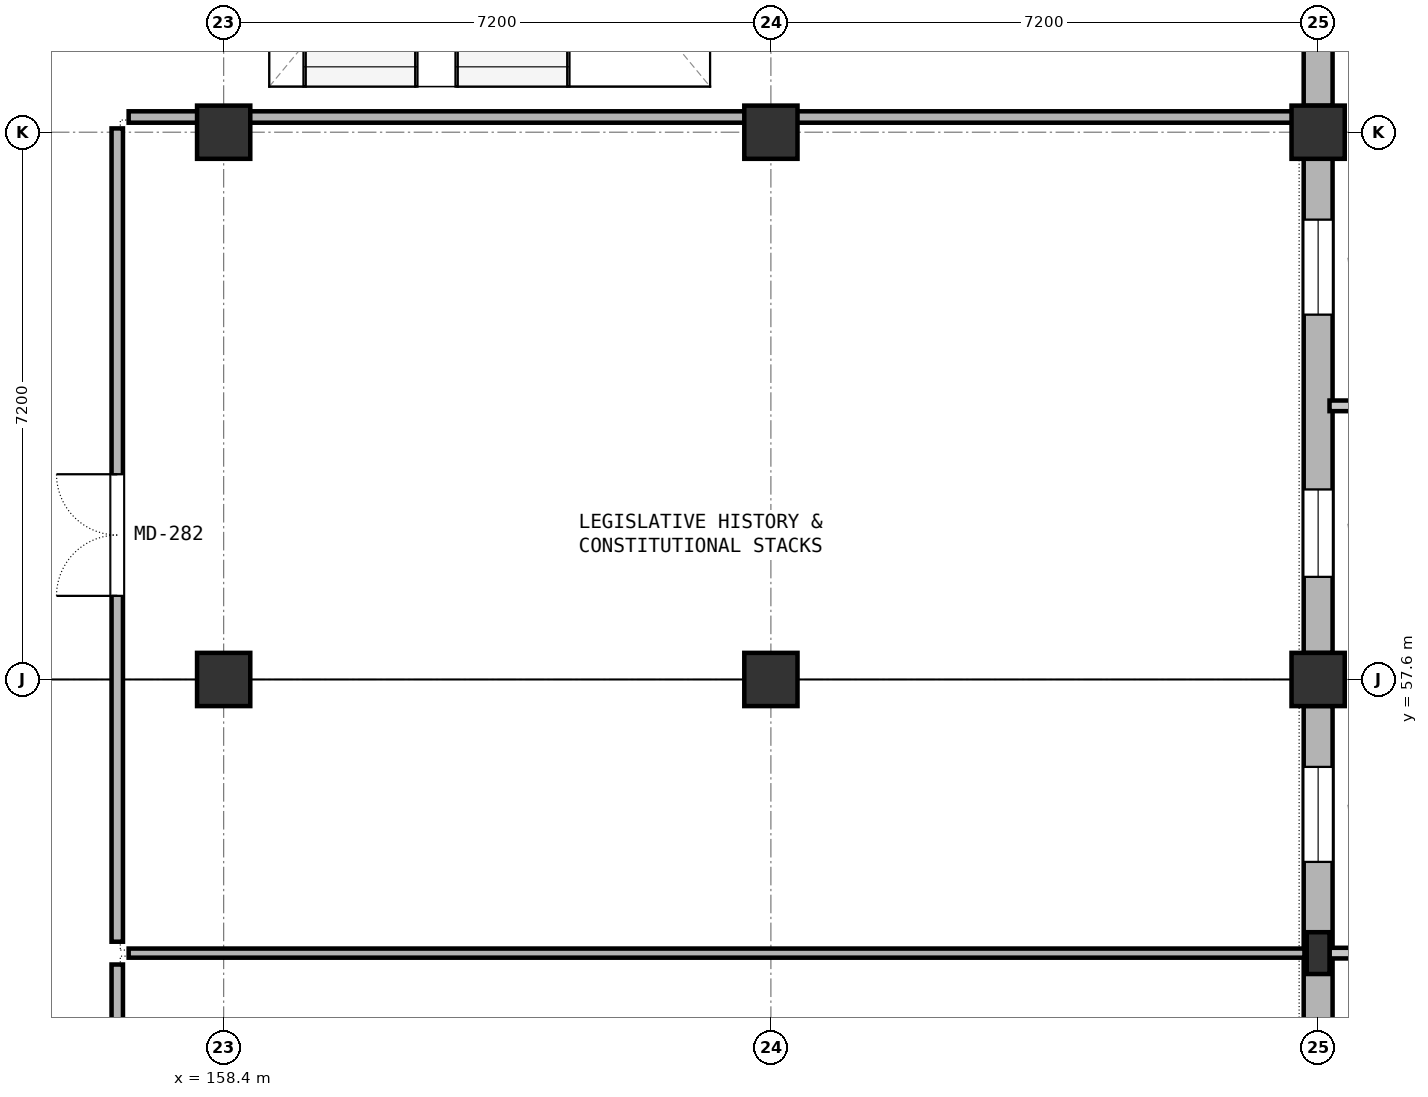
"""IFC4 building model, lengths in metres.
Left out: names, types, materials, properties, quantities, classifications, styles, units other than length and angle.
Written with IfcOpenShell. Run it as: python <this file> out.ifc"""

import sys

from ifc_helpers import new_model, si_unit, direction, frame, frame_2d, origin, origin_2d, place, context, subcontext, project, spatial, rectangle, extrude, element, fill, save


model = new_model("IFC4")
c1 = context("Model", 3, precision=1e-05, world=origin(), true_north=direction((0.0, 1.0)))
c2 = subcontext(c1, "Body", "Model", "MODEL_VIEW")
j1 = project(units=[si_unit("LENGTHUNIT", "METRE"), si_unit("PLANEANGLEUNIT", "RADIAN")], contexts=[c1])
p1 = place(None, origin())
s1 = spatial("IfcSite", under=j1, at=p1, CompositionType="ELEMENT")
p2 = place(p1, origin())
s2 = spatial("IfcBuilding", under=s1, at=p2, CompositionType="ELEMENT")
p3 = place(p2, frame((0.0, 0.0, 5.4)))
s3 = spatial("IfcBuildingStorey", under=s2, at=p3, CompositionType="ELEMENT", Elevation=5.4)
for number, where, z_axis, x_axis in (
    (1, (158.4, 57.6, 0.0), (0.0, 0.0, 1.0), (1.0, 0.0, 0.0)),
    (2, (158.4, 64.8, 0.0), (0.0, 0.0, 1.0), (1.0, 0.0, 0.0)),
    (3, (165.6, 57.6, 0.0), (0.0, 0.0, 1.0), (1.0, 0.0, 0.0)),
    (4, (165.6, 64.8, 0.0), (0.0, 0.0, 1.0), (1.0, 0.0, 0.0)),
    (5, (172.8, 57.6, 0.0), (0.0, 0.0, 1.0), (1.0, 0.0, 0.0)),
    (6, (172.8, 64.8, 0.0), (0.0, 0.0, 1.0), (1.0, 0.0, 0.0)),
):
    element("IfcColumn", number, at=place(p3, frame(where, z_axis=z_axis, x_axis=x_axis)), inside=s3, PredefinedType="COLUMN", context=c2, shape_type="SweptSolid", body=[
        extrude(rectangle(XDim=0.7, YDim=0.7, at=origin_2d()), origin(), (0.0, 0.0, 1.0), 4.8),
    ])
p4 = place(p3, frame((172.8, 54.0, 0.0), z_axis=(0.0, 0.0, 1.0), x_axis=(0.0, 1.0, 0.0)))
e7 = element("IfcColumn", 7, at=p4, inside=s3, PredefinedType="PILASTER", context=c2, shape_type="SweptSolid", body=[
    extrude(rectangle(XDim=0.55, YDim=0.3, at=origin_2d()), origin(), (0.0, 0.0, 1.0), 4.8),
])
p5 = place(p3, frame((172.8, 57.252, 0.0), z_axis=(0.0, 0.0, 1.0), x_axis=(0.0, -1.0, 0.0)))
e8 = element("IfcWall", 8, at=p5, inside=s3, PredefinedType="SOLIDWALL", context=c2, shape_type="SweptSolid", body=[
    extrude(rectangle(XDim=6.504, YDim=0.38, at=frame_2d((3.252, 0.0))), origin(), (0.0, 0.0, 1.0), 3.5),
])
p6 = place(p5, frame((0.802, 0.0, 0.65)))
e9 = element("IfcOpeningElement", 9, at=p6, cuts=e8, PredefinedType="OPENING", context=c2, shape_type="SweptSolid", body=[
    extrude(rectangle(XDim=1.25, YDim=2.5, at=frame_2d((0.625, 1.25))), frame((0.0, 0.2, 0.0), z_axis=(0.0, -1.0, 0.0), x_axis=(1.0, 0.0, 0.0)), (0.0, 0.0, 1.0), 0.4),
])
p7 = place(p5, frame((4.352, 0.0, 0.65)))
e10 = element("IfcOpeningElement", 10, at=p7, cuts=e8, PredefinedType="OPENING", context=c2, shape_type="SweptSolid", body=[
    extrude(rectangle(XDim=1.15, YDim=2.3, at=frame_2d((0.575, 1.15))), frame((0.0, 0.2, 0.0), z_axis=(0.0, -1.0, 0.0), x_axis=(1.0, 0.0, 0.0)), (0.0, 0.0, 1.0), 0.4),
])
p8 = place(p3, frame((172.8, 64.452, 0.0), z_axis=(0.0, 0.0, 1.0), x_axis=(0.0, -1.0, 0.0)))
e11 = element("IfcWall", 11, at=p8, inside=s3, PredefinedType="SOLIDWALL", context=c2, shape_type="SweptSolid", body=[
    extrude(rectangle(XDim=6.504, YDim=0.38, at=frame_2d((3.252, 0.0))), origin(), (0.0, 0.0, 1.0), 3.5),
])
p9 = place(p8, frame((0.802, 0.0, 0.65)))
e12 = element("IfcOpeningElement", 12, at=p9, cuts=e11, PredefinedType="OPENING", context=c2, shape_type="SweptSolid", body=[
    extrude(rectangle(XDim=1.25, YDim=2.5, at=frame_2d((0.625, 1.25))), frame((0.0, 0.2, 0.0), z_axis=(0.0, -1.0, 0.0), x_axis=(1.0, 0.0, 0.0)), (0.0, 0.0, 1.0), 0.4),
])
p10 = place(p8, frame((4.352, 0.0, 0.65)))
e13 = element("IfcOpeningElement", 13, at=p10, cuts=e11, PredefinedType="OPENING", context=c2, shape_type="SweptSolid", body=[
    extrude(rectangle(XDim=1.15, YDim=2.3, at=frame_2d((0.575, 1.15))), frame((0.0, 0.2, 0.0), z_axis=(0.0, -1.0, 0.0), x_axis=(1.0, 0.0, 0.0)), (0.0, 0.0, 1.0), 0.4),
])
p11 = place(p3, frame((172.8, 71.652, 0.0), z_axis=(0.0, 0.0, 1.0), x_axis=(0.0, -1.0, 0.0)))
e14 = element("IfcWall", 14, at=p11, inside=s3, PredefinedType="SOLIDWALL", context=c2, shape_type="SweptSolid", body=[
    extrude(rectangle(XDim=6.504, YDim=0.38, at=frame_2d((3.252, 0.0))), origin(), (0.0, 0.0, 1.0), 3.5),
])
p12 = place(p11, frame((0.802, 0.0, 0.65)))
e15 = element("IfcOpeningElement", 15, at=p12, cuts=e14, PredefinedType="OPENING", context=c2, shape_type="SweptSolid", body=[
    extrude(rectangle(XDim=1.25, YDim=2.5, at=frame_2d((0.625, 1.25))), frame((0.0, 0.2, 0.0), z_axis=(0.0, -1.0, 0.0), x_axis=(1.0, 0.0, 0.0)), (0.0, 0.0, 1.0), 0.4),
])
p13 = place(p11, frame((4.352, 0.0, 0.65)))
e16 = element("IfcOpeningElement", 16, at=p13, cuts=e14, PredefinedType="OPENING", context=c2, shape_type="SweptSolid", body=[
    extrude(rectangle(XDim=1.15, YDim=2.3, at=frame_2d((0.575, 1.15))), frame((0.0, 0.2, 0.0), z_axis=(0.0, -1.0, 0.0), x_axis=(1.0, 0.0, 0.0)), (0.0, 0.0, 1.0), 0.4),
])
p14 = place(p3, frame((157.0, 36.95, 0.0), z_axis=(0.0, 0.0, 1.0), x_axis=(0.0, 1.0, 0.0)))
e17 = element("IfcWall", 17, at=p14, inside=s3, PredefinedType="PARTITIONING", context=c2, shape_type="SweptSolid", body=[
    extrude(rectangle(XDim=16.9, YDim=0.15, at=frame_2d((8.45, 0.0))), origin(), (0.0, 0.0, 1.0), 3.52),
])
p15 = place(p14, frame((7.65, 0.0, 0.0)))
e18 = element("IfcOpeningElement", 18, at=p15, cuts=e17, PredefinedType="OPENING", context=c2, shape_type="SweptSolid", body=[
    extrude(rectangle(XDim=1.6, YDim=2.2, at=frame_2d((0.8, 1.1))), frame((0.0, 0.085, 0.0), z_axis=(0.0, -1.0, 0.0), x_axis=(1.0, 0.0, 0.0)), (0.0, 0.0, 1.0), 0.17),
])
p16 = place(p3, frame((157.0, 54.15, 0.0), z_axis=(0.0, 0.0, 1.0), x_axis=(0.0, 1.0, 0.0)))
e19 = element("IfcWall", 19, at=p16, inside=s3, PredefinedType="PARTITIONING", context=c2, shape_type="SweptSolid", body=[
    extrude(rectangle(XDim=10.7, YDim=0.15, at=frame_2d((5.35, 0.0))), origin(), (0.0, 0.0, 1.0), 3.52),
])
p17 = place(p16, frame((4.55, 0.0, 0.0)))
e20 = element("IfcOpeningElement", 20, at=p17, cuts=e19, PredefinedType="OPENING", context=c2, shape_type="SweptSolid", body=[
    extrude(rectangle(XDim=1.6, YDim=2.2, at=frame_2d((0.8, 1.1))), frame((0.0, 0.085, 0.0), z_axis=(0.0, -1.0, 0.0), x_axis=(1.0, 0.0, 0.0)), (0.0, 0.0, 1.0), 0.17),
])
p18 = place(p3, frame((157.15, 54.0, 0.0), z_axis=(0.0, 0.0, 1.0), x_axis=(1.0, 0.0, 0.0)))
e21 = element("IfcWall", 21, at=p18, inside=s3, PredefinedType="PARTITIONING", context=c2, shape_type="SweptSolid", body=[
    extrude(rectangle(XDim=15.47, YDim=0.12, at=frame_2d((7.735, 0.0))), origin(), (0.0, 0.0, 1.0), 3.52),
])
p19 = place(p3, frame((157.15, 65.0, 0.0), z_axis=(0.0, 0.0, 1.0), x_axis=(1.0, 0.0, 0.0)))
e22 = element("IfcWall", 22, at=p19, inside=s3, PredefinedType="PARTITIONING", context=c2, shape_type="SweptSolid", body=[
    extrude(rectangle(XDim=15.47, YDim=0.15, at=frame_2d((7.735, 0.0))), origin(), (0.0, 0.0, 1.0), 3.52),
])
p20 = place(p6, origin())
e23 = element("IfcWindow", 23, at=p20, inside=s3, PartitioningType="DOUBLE_PANEL_VERTICAL", PredefinedType="WINDOW", context=c2, shape_type="SweptSolid", body=[
    extrude(rectangle(XDim=1.25, YDim=2.5, at=frame_2d((0.625, 1.25))), frame((0.0, 0.03, 0.0), z_axis=(0.0, -1.0, 0.0), x_axis=(1.0, 0.0, 0.0)), (0.0, 0.0, 1.0), 0.06),
])
fill(e9, e23)
p21 = place(p9, origin())
e24 = element("IfcWindow", 24, at=p21, inside=s3, PartitioningType="DOUBLE_PANEL_VERTICAL", PredefinedType="WINDOW", context=c2, shape_type="SweptSolid", body=[
    extrude(rectangle(XDim=1.25, YDim=2.5, at=frame_2d((0.625, 1.25))), frame((0.0, 0.03, 0.0), z_axis=(0.0, -1.0, 0.0), x_axis=(1.0, 0.0, 0.0)), (0.0, 0.0, 1.0), 0.06),
])
fill(e12, e24)
p22 = place(p10, origin())
e25 = element("IfcWindow", 25, at=p22, inside=s3, PartitioningType="SINGLE_PANEL", PredefinedType="WINDOW", context=c2, shape_type="SweptSolid", body=[
    extrude(rectangle(XDim=1.15, YDim=2.3, at=frame_2d((0.575, 1.15))), frame((0.0, 0.03, 0.0), z_axis=(0.0, -1.0, 0.0), x_axis=(1.0, 0.0, 0.0)), (0.0, 0.0, 1.0), 0.06),
])
fill(e13, e25)
p23 = place(p17, origin())
e26 = element("IfcDoor", 26, at=p23, inside=s3, OperationType="DOUBLE_DOOR_SINGLE_SWING", PredefinedType="DOOR", context=c2, shape_type="SweptSolid", body=[
    extrude(rectangle(XDim=1.6, YDim=2.2, at=frame_2d((0.8, 1.1))), frame((0.0, 0.025, 0.0), z_axis=(0.0, -1.0, 0.0), x_axis=(1.0, 0.0, 0.0)), (0.0, 0.0, 1.0), 0.05),
])
fill(e20, e26)
save(model, sys.argv[1])
